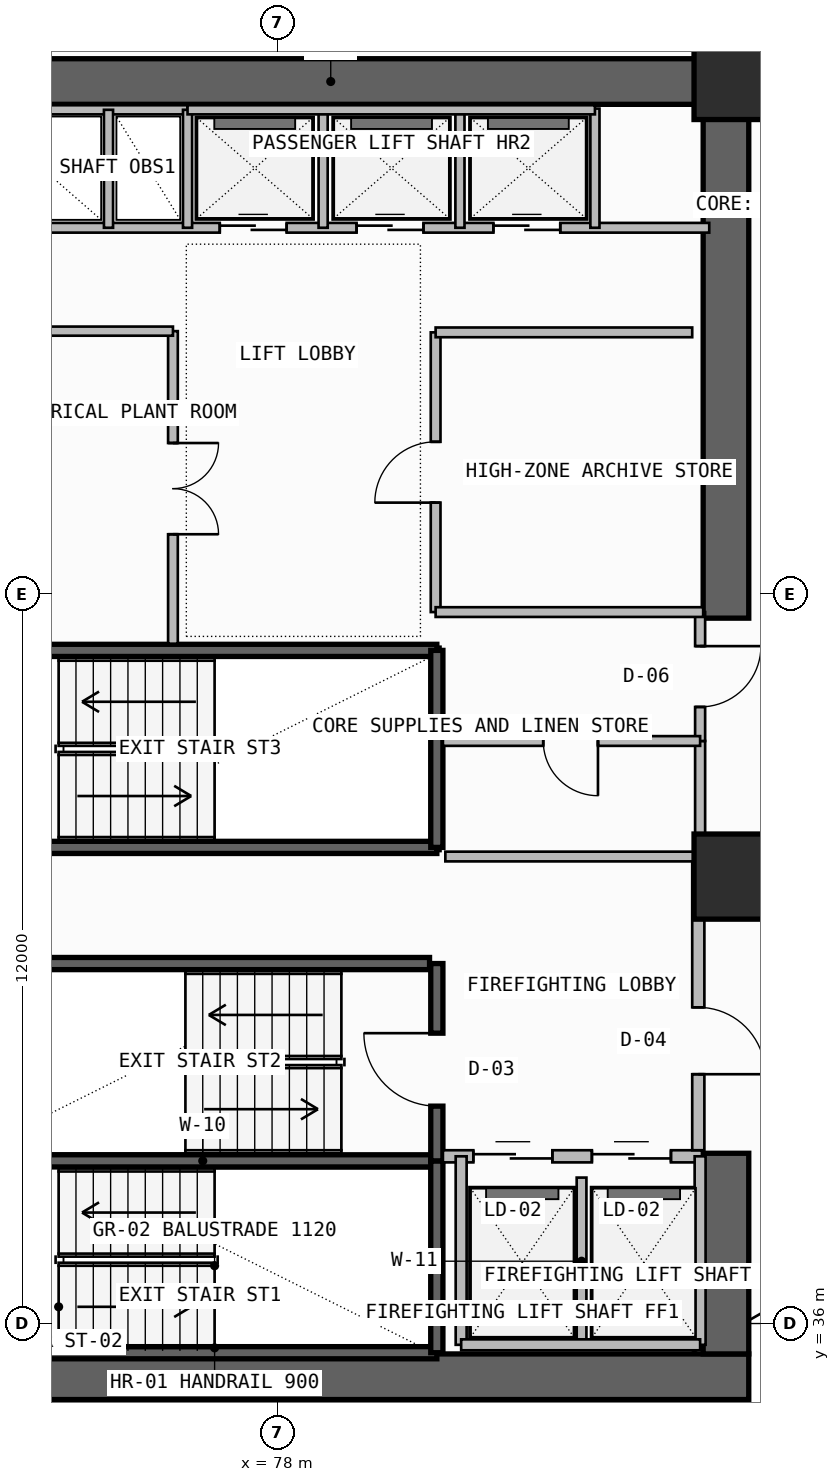
"""IFC4 building model, lengths in metres.
Left out: names, types, materials, properties, quantities, classifications, styles, units other than length and angle.
Written with IfcOpenShell. Run it as: python <this file> out.ifc"""

import sys

from ifc_helpers import new_model, si_unit, direction, frame, frame_2d, origin, origin_2d, place, context, subcontext, project, spatial, rectangle, extrude, element, fill, save


model = new_model("IFC4")
c1 = context("Model", 3, precision=1e-05, world=origin(), true_north=direction((0.0, 1.0)))
c2 = subcontext(c1, "Body", "Model", "MODEL_VIEW")
j1 = project(units=[si_unit("LENGTHUNIT", "METRE"), si_unit("PLANEANGLEUNIT", "RADIAN")], contexts=[c1])
p1 = place(None, origin())
s1 = spatial("IfcSite", under=j1, at=p1, CompositionType="ELEMENT")
p2 = place(p1, origin())
s2 = spatial("IfcBuilding", under=s1, at=p2, CompositionType="ELEMENT")
p3 = place(p2, frame((0.0, 0.0, 200.9)))
s3 = spatial("IfcBuildingStorey", under=s2, at=p3, CompositionType="ELEMENT", Elevation=200.9)
p4 = place(p3, frame((72.15, 35.125, -0.4), z_axis=(0.0, 0.0, 1.0), x_axis=(1.0, 0.0, 0.0)))
e1 = element("IfcWall", 1, at=p4, inside=s3, PredefinedType="SHEAR", context=c2, shape_type="SweptSolid", body=[
    extrude(rectangle(XDim=13.6, YDim=0.75, at=frame_2d((6.8, 0.0))), origin(), (0.0, 0.0, 1.0), 3.66),
])
p5 = place(p3, frame((85.375, 35.5, -0.4), z_axis=(0.0, 0.0, 1.0), x_axis=(0.0, 1.0, 0.0)))
e2 = element("IfcWall", 2, at=p5, inside=s3, PredefinedType="SHEAR", context=c2, shape_type="SweptSolid", body=[
    extrude(rectangle(XDim=3.3, YDim=0.75, at=frame_2d((1.65, 0.0))), origin(), (0.0, 0.0, 1.0), 3.66),
])
p6 = place(p3, frame((72.0, 56.425, -0.4), z_axis=(0.0, 0.0, 1.0), x_axis=(1.0, 0.0, 0.0)))
e3 = element("IfcWall", 3, at=p6, inside=s3, PredefinedType="SHEAR", context=c2, shape_type="SweptSolid", body=[
    extrude(rectangle(XDim=13.75, YDim=0.75, at=frame_2d((6.875, 0.0))), origin(), (0.0, 0.0, 1.0), 3.66),
])
p7 = place(p3, frame((85.375, 47.6, -0.4), z_axis=(0.0, 0.0, 1.0), x_axis=(0.0, 1.0, 0.0)))
e4 = element("IfcWall", 4, at=p7, inside=s3, PredefinedType="SHEAR", context=c2, shape_type="SweptSolid", body=[
    extrude(rectangle(XDim=8.45, YDim=0.75, at=frame_2d((4.225, 0.0))), origin(), (0.0, 0.0, 1.0), 3.66),
])
for number, where, z_axis, x_axis in (
    (5, (85.55, 43.35, 0.0), (0.0, 0.0, 1.0), (1.0, 0.0, 0.0)),
    (6, (85.55, 56.5, 0.0), (0.0, 0.0, 1.0), (1.0, 0.0, 0.0)),
):
    element("IfcColumn", number, at=place(p3, frame(where, z_axis=z_axis, x_axis=x_axis)), inside=s3, PredefinedType="COLUMN", context=c2, shape_type="SweptSolid", body=[
        extrude(rectangle(XDim=1.4, YDim=1.4, at=origin_2d()), origin(), (0.0, 0.0, 1.0), 3.52),
    ])
p8 = place(p3, frame((116.396, 56.722, 0.0), z_axis=(0.0, 0.0, 1.0), x_axis=(-0.977936620644, 0.208901809478, 0.0)))
e7 = element("IfcWall", 7, at=p8, inside=s3, PredefinedType="PARAPET", context=c2, shape_type="SweptSolid", body=[
    extrude(rectangle(XDim=31.685, YDim=0.2, at=frame_2d((15.843, 0.0))), origin(), (0.0, 0.0, 1.0), 1.15),
])
for number, where, z_axis, x_axis in (
    (8, (72.92, 35.52, -0.4), (0.0, 0.0, 1.0), (1.0, 0.0, 0.0)),
    (9, (72.92, 38.675, -0.4), (0.0, 0.0, 1.0), (1.0, 0.0, 0.0)),
):
    element("IfcWall", number, at=place(p3, frame(where, z_axis=z_axis, x_axis=x_axis)), inside=s3, PredefinedType="SOLIDWALL", context=c2, shape_type="SweptSolid", body=[
        extrude(rectangle(XDim=7.7, YDim=0.2, at=frame_2d((3.85, 0.0))), origin(), (0.0, 0.0, 1.0), 3.66),
    ])
p9 = place(p3, frame((80.62, 35.52, -0.4), z_axis=(0.0, 0.0, 1.0), x_axis=(0.0, 1.0, 0.0)))
e10 = element("IfcWall", 10, at=p9, inside=s3, PredefinedType="SOLIDWALL", context=c2, shape_type="SweptSolid", body=[
    extrude(rectangle(XDim=3.155, YDim=0.2, at=frame_2d((1.578, 0.0))), origin(), (0.0, 0.0, 1.0), 3.66),
])
p10 = place(p3, frame((80.62, 38.675, -0.4), z_axis=(0.0, 0.0, 1.0), x_axis=(0.0, 1.0, 0.0)))
e11 = element("IfcWall", 11, at=p10, inside=s3, PredefinedType="SOLIDWALL", context=c2, shape_type="SweptSolid", body=[
    extrude(rectangle(XDim=3.245, YDim=0.2, at=frame_2d((1.623, 0.0))), origin(), (0.0, 0.0, 1.0), 3.66),
])
p11 = place(p10, frame((0.9, 0.0, 0.4)))
e12 = element("IfcOpeningElement", 12, at=p11, cuts=e11, PredefinedType="OPENING", context=c2, shape_type="SweptSolid", body=[
    extrude(rectangle(XDim=1.2, YDim=2.2, at=frame_2d((0.6, 1.1))), frame((0.0, 0.11, 0.0), z_axis=(0.0, -1.0, 0.0), x_axis=(1.0, 0.0, 0.0)), (0.0, 0.0, 1.0), 0.22),
])
p12 = place(p3, frame((80.72, 38.75, 0.0), z_axis=(0.0, 0.0, 1.0), x_axis=(1.0, 0.0, 0.0)))
e13 = element("IfcWall", 13, at=p12, inside=s3, PredefinedType="SOLIDWALL", context=c2, shape_type="SweptSolid", body=[
    extrude(rectangle(XDim=4.26, YDim=0.2, at=frame_2d((2.13, 0.0))), origin(), (0.0, 0.0, 1.0), 3.26),
])
p13 = place(p12, frame((0.5, 0.0, 0.0)))
e14 = element("IfcOpeningElement", 14, at=p13, cuts=e13, PredefinedType="OPENING", context=c2, shape_type="SweptSolid", body=[
    extrude(rectangle(XDim=1.3, YDim=2.3, at=frame_2d((0.65, 1.15))), frame((0.0, 0.11, 0.0), z_axis=(0.0, -1.0, 0.0), x_axis=(1.0, 0.0, 0.0)), (0.0, 0.0, 1.0), 0.22),
])
p14 = place(p12, frame((2.45, 0.0, 0.0)))
e15 = element("IfcOpeningElement", 15, at=p14, cuts=e13, PredefinedType="OPENING", context=c2, shape_type="SweptSolid", body=[
    extrude(rectangle(XDim=1.3, YDim=2.3, at=frame_2d((0.65, 1.15))), frame((0.0, 0.11, 0.0), z_axis=(0.0, -1.0, 0.0), x_axis=(1.0, 0.0, 0.0)), (0.0, 0.0, 1.0), 0.22),
])
p15 = place(p3, frame((83.0, 35.65, 0.0), z_axis=(0.0, 0.0, 1.0), x_axis=(0.0, 1.0, 0.0)))
e16 = element("IfcWall", 16, at=p15, inside=s3, PredefinedType="PLUMBINGWALL", context=c2, shape_type="SweptSolid", body=[
    extrude(rectangle(XDim=2.75, YDim=0.16, at=frame_2d((1.375, 0.0))), origin(), (0.0, 0.0, 1.0), 3.26),
])
for number, where, z_axis, x_axis in (
    (17, (84.95, 35.65, 0.0), (0.0, 0.0, 1.0), (0.0, 1.0, 0.0)),
    (18, (81.02, 35.65, 0.0), (0.0, 0.0, 1.0), (0.0, 1.0, 0.0)),
):
    element("IfcWall", number, at=place(p3, frame(where, z_axis=z_axis, x_axis=x_axis)), inside=s3, PredefinedType="SOLIDWALL", context=c2, shape_type="SweptSolid", body=[
        extrude(rectangle(XDim=3.1, YDim=0.18, at=frame_2d((1.55, 0.0))), origin(), (0.0, 0.0, 1.0), 3.26),
    ])
p16 = place(p3, frame((81.02, 35.65, 0.0), z_axis=(0.0, 0.0, 1.0), x_axis=(1.0, 0.0, 0.0)))
e19 = element("IfcWall", 19, at=p16, inside=s3, PredefinedType="SOLIDWALL", context=c2, shape_type="SweptSolid", body=[
    extrude(rectangle(XDim=3.93, YDim=0.18, at=frame_2d((1.965, 0.0))), origin(), (0.0, 0.0, 1.0), 3.26),
])
p17 = place(p3, frame((84.92, 38.85, 0.0), z_axis=(0.0, 0.0, 1.0), x_axis=(0.0, 1.0, 0.0)))
e20 = element("IfcWall", 20, at=p17, inside=s3, PredefinedType="SOLIDWALL", context=c2, shape_type="SweptSolid", body=[
    extrude(rectangle(XDim=4.83, YDim=0.2, at=frame_2d((2.415, 0.0))), origin(), (0.0, 0.0, 1.0), 3.26),
])
p18 = place(p17, frame((1.25, 0.0, 0.0)))
e21 = element("IfcOpeningElement", 21, at=p18, cuts=e20, PredefinedType="OPENING", context=c2, shape_type="SweptSolid", body=[
    extrude(rectangle(XDim=1.1, YDim=2.2, at=frame_2d((0.55, 1.1))), frame((0.0, 0.11, 0.0), z_axis=(0.0, -1.0, 0.0), x_axis=(1.0, 0.0, 0.0)), (0.0, 0.0, 1.0), 0.22),
])
p19 = place(p3, frame((72.92, 41.92, -0.4), z_axis=(0.0, 0.0, 1.0), x_axis=(1.0, 0.0, 0.0)))
e22 = element("IfcWall", 22, at=p19, inside=s3, PredefinedType="SOLIDWALL", context=c2, shape_type="SweptSolid", body=[
    extrude(rectangle(XDim=7.58, YDim=0.2, at=frame_2d((3.79, 0.0))), origin(), (0.0, 0.0, 1.0), 3.66),
])
for number, where, z_axis, x_axis in (
    (23, (72.92, 43.83, -0.4), (0.0, 0.0, 1.0), (1.0, 0.0, 0.0)),
    (24, (72.92, 47.07, -0.4), (0.0, 0.0, 1.0), (1.0, 0.0, 0.0)),
):
    element("IfcWall", number, at=place(p3, frame(where, z_axis=z_axis, x_axis=x_axis)), inside=s3, PredefinedType="SOLIDWALL", context=c2, shape_type="SweptSolid", body=[
        extrude(rectangle(XDim=7.7, YDim=0.2, at=frame_2d((3.85, 0.0))), origin(), (0.0, 0.0, 1.0), 3.66),
    ])
p20 = place(p3, frame((80.62, 43.83, -0.4), z_axis=(0.0, 0.0, 1.0), x_axis=(0.0, 1.0, 0.0)))
e25 = element("IfcWall", 25, at=p20, inside=s3, PredefinedType="SOLIDWALL", context=c2, shape_type="SweptSolid", body=[
    extrude(rectangle(XDim=3.24, YDim=0.2, at=frame_2d((1.62, 0.0))), origin(), (0.0, 0.0, 1.0), 3.66),
])
p21 = place(p3, frame((84.95, 43.68, 0.0), z_axis=(0.0, 0.0, 1.0), x_axis=(0.0, 1.0, 0.0)))
e26 = element("IfcWall", 26, at=p21, inside=s3, PredefinedType="PLUMBINGWALL", context=c2, shape_type="SweptSolid", body=[
    extrude(rectangle(XDim=1.9, YDim=0.165, at=frame_2d((0.95, 0.0))), origin(), (0.0, 0.0, 1.0), 3.26),
])
p22 = place(p3, frame((84.95, 45.58, 0.0), z_axis=(0.0, 0.0, 1.0), x_axis=(0.0, 1.0, 0.0)))
e27 = element("IfcWall", 27, at=p22, inside=s3, PredefinedType="PARTITIONING", context=c2, shape_type="SweptSolid", body=[
    extrude(rectangle(XDim=2.12, YDim=0.165, at=frame_2d((1.06, 0.0))), origin(), (0.0, 0.0, 1.0), 3.26),
])
p23 = place(p22, frame((0.56, 0.0, 0.0)))
e28 = element("IfcOpeningElement", 28, at=p23, cuts=e27, PredefinedType="OPENING", context=c2, shape_type="SweptSolid", body=[
    extrude(rectangle(XDim=1.0, YDim=2.2, at=frame_2d((0.5, 1.1))), frame((0.0, 0.093, 0.0), z_axis=(0.0, -1.0, 0.0), x_axis=(1.0, 0.0, 0.0)), (0.0, 0.0, 1.0), 0.185),
])
p24 = place(p3, frame((80.72, 45.58, 0.0), z_axis=(0.0, 0.0, 1.0), x_axis=(1.0, 0.0, 0.0)))
e29 = element("IfcWall", 29, at=p24, inside=s3, PredefinedType="PLUMBINGWALL", context=c2, shape_type="SweptSolid", body=[
    extrude(rectangle(XDim=4.23, YDim=0.16, at=frame_2d((2.115, 0.0))), origin(), (0.0, 0.0, 1.0), 3.26),
])
p25 = place(p24, frame((1.65, 0.0, 0.0)))
e30 = element("IfcOpeningElement", 30, at=p25, cuts=e29, PredefinedType="OPENING", context=c2, shape_type="SweptSolid", body=[
    extrude(rectangle(XDim=0.9, YDim=2.1, at=frame_2d((0.45, 1.05))), frame((0.0, 0.09, 0.0), z_axis=(0.0, -1.0, 0.0), x_axis=(1.0, 0.0, 0.0)), (0.0, 0.0, 1.0), 0.18),
])
p26 = place(p3, frame((80.76, 43.68, 0.0), z_axis=(0.0, 0.0, 1.0), x_axis=(1.0, 0.0, 0.0)))
e31 = element("IfcWall", 31, at=p26, inside=s3, PredefinedType="PLUMBINGWALL", context=c2, shape_type="SweptSolid", body=[
    extrude(rectangle(XDim=4.19, YDim=0.16, at=frame_2d((2.095, 0.0))), origin(), (0.0, 0.0, 1.0), 3.26),
])
p27 = place(p3, frame((76.28, 47.18, 0.0), z_axis=(0.0, 0.0, 1.0), x_axis=(0.0, 1.0, 0.0)))
e32 = element("IfcWall", 32, at=p27, inside=s3, PredefinedType="SOLIDWALL", context=c2, shape_type="SweptSolid", body=[
    extrude(rectangle(XDim=5.14, YDim=0.16, at=frame_2d((2.57, 0.0))), origin(), (0.0, 0.0, 1.0), 3.26),
])
p28 = place(p27, frame((1.8, 0.0, 0.0)))
e33 = element("IfcOpeningElement", 33, at=p28, cuts=e32, PredefinedType="OPENING", context=c2, shape_type="SweptSolid", body=[
    extrude(rectangle(XDim=1.5, YDim=2.25, at=frame_2d((0.75, 1.125))), frame((0.0, 0.09, 0.0), z_axis=(0.0, -1.0, 0.0), x_axis=(1.0, 0.0, 0.0)), (0.0, 0.0, 1.0), 0.18),
])
p29 = place(p3, frame((72.95, 52.32, 0.0), z_axis=(0.0, 0.0, 1.0), x_axis=(1.0, 0.0, 0.0)))
e34 = element("IfcWall", 34, at=p29, inside=s3, PredefinedType="SOLIDWALL", context=c2, shape_type="SweptSolid", body=[
    extrude(rectangle(XDim=3.33, YDim=0.15, at=frame_2d((1.665, 0.0))), origin(), (0.0, 0.0, 1.0), 3.26),
])
p30 = place(p3, frame((80.6, 47.7, 0.0), z_axis=(0.0, 0.0, 1.0), x_axis=(0.0, 1.0, 0.0)))
e35 = element("IfcWall", 35, at=p30, inside=s3, PredefinedType="SOLIDWALL", context=c2, shape_type="SweptSolid", body=[
    extrude(rectangle(XDim=4.6, YDim=0.16, at=frame_2d((2.3, 0.0))), origin(), (0.0, 0.0, 1.0), 3.26),
])
p31 = place(p30, frame((1.8, 0.0, 0.0)))
e36 = element("IfcOpeningElement", 36, at=p31, cuts=e35, PredefinedType="OPENING", context=c2, shape_type="SweptSolid", body=[
    extrude(rectangle(XDim=1.0, YDim=2.2, at=frame_2d((0.5, 1.1))), frame((0.0, 0.09, 0.0), z_axis=(0.0, -1.0, 0.0), x_axis=(1.0, 0.0, 0.0)), (0.0, 0.0, 1.0), 0.18),
])
p32 = place(p3, frame((80.6, 47.7, 0.0), z_axis=(0.0, 0.0, 1.0), x_axis=(1.0, 0.0, 0.0)))
e37 = element("IfcWall", 37, at=p32, inside=s3, PredefinedType="SOLIDWALL", context=c2, shape_type="SweptSolid", body=[
    extrude(rectangle(XDim=4.4, YDim=0.16, at=frame_2d((2.2, 0.0))), origin(), (0.0, 0.0, 1.0), 3.26),
])
p33 = place(p3, frame((80.6, 52.3, 0.0), z_axis=(0.0, 0.0, 1.0), x_axis=(1.0, 0.0, 0.0)))
e38 = element("IfcWall", 38, at=p33, inside=s3, PredefinedType="SOLIDWALL", context=c2, shape_type="SweptSolid", body=[
    extrude(rectangle(XDim=4.22, YDim=0.16, at=frame_2d((2.11, 0.0))), origin(), (0.0, 0.0, 1.0), 3.26),
])
p34 = place(p3, frame((73.02, 54.02, 0.0), z_axis=(0.0, 0.0, 1.0), x_axis=(1.0, 0.0, 0.0)))
e39 = element("IfcWall", 39, at=p34, inside=s3, PredefinedType="SOLIDWALL", context=c2, shape_type="SweptSolid", body=[
    extrude(rectangle(XDim=12.08, YDim=0.16, at=frame_2d((6.04, 0.0))), origin(), (0.0, 0.0, 1.0), 3.26),
])
p35 = place(p34, frame((4.03, 0.0, 0.0)))
e40 = element("IfcOpeningElement", 40, at=p35, cuts=e39, PredefinedType="OPENING", context=c2, shape_type="SweptSolid", body=[
    extrude(rectangle(XDim=1.1, YDim=2.25, at=frame_2d((0.55, 1.125))), frame((0.0, 0.09, 0.0), z_axis=(0.0, -1.0, 0.0), x_axis=(1.0, 0.0, 0.0)), (0.0, 0.0, 1.0), 0.18),
])
p36 = place(p34, frame((6.28, 0.0, 0.0)))
e41 = element("IfcOpeningElement", 41, at=p36, cuts=e39, PredefinedType="OPENING", context=c2, shape_type="SweptSolid", body=[
    extrude(rectangle(XDim=1.1, YDim=2.25, at=frame_2d((0.55, 1.125))), frame((0.0, 0.09, 0.0), z_axis=(0.0, -1.0, 0.0), x_axis=(1.0, 0.0, 0.0)), (0.0, 0.0, 1.0), 0.18),
])
p37 = place(p34, frame((8.53, 0.0, 0.0)))
e42 = element("IfcOpeningElement", 42, at=p37, cuts=e39, PredefinedType="OPENING", context=c2, shape_type="SweptSolid", body=[
    extrude(rectangle(XDim=1.1, YDim=2.25, at=frame_2d((0.55, 1.125))), frame((0.0, 0.09, 0.0), z_axis=(0.0, -1.0, 0.0), x_axis=(1.0, 0.0, 0.0)), (0.0, 0.0, 1.0), 0.18),
])
p38 = place(p3, frame((73.02, 55.96, 0.0), z_axis=(0.0, 0.0, 1.0), x_axis=(1.0, 0.0, 0.0)))
e43 = element("IfcWall", 43, at=p38, inside=s3, PredefinedType="SOLIDWALL", context=c2, shape_type="SweptSolid", body=[
    extrude(rectangle(XDim=3.5, YDim=0.15, at=frame_2d((1.75, 0.0))), origin(), (0.0, 0.0, 1.0), 3.26),
])
p39 = place(p3, frame((76.52, 54.02, 0.0), z_axis=(0.0, 0.0, 1.0), x_axis=(0.0, 1.0, 0.0)))
e44 = element("IfcWall", 44, at=p39, inside=s3, PredefinedType="SOLIDWALL", context=c2, shape_type="SweptSolid", body=[
    extrude(rectangle(XDim=1.94, YDim=0.15, at=frame_2d((0.97, 0.0))), origin(), (0.0, 0.0, 1.0), 3.26),
])
p40 = place(p3, frame((75.22, 54.02, 0.0), z_axis=(0.0, 0.0, 1.0), x_axis=(0.0, 1.0, 0.0)))
e45 = element("IfcWall", 45, at=p40, inside=s3, PredefinedType="PLUMBINGWALL", context=c2, shape_type="SweptSolid", body=[
    extrude(rectangle(XDim=1.94, YDim=0.15, at=frame_2d((0.97, 0.0))), origin(), (0.0, 0.0, 1.0), 3.26),
])
for number, where, z_axis, x_axis in (
    (46, (78.75, 54.02, 0.0), (0.0, 0.0, 1.0), (0.0, 1.0, 0.0)),
    (47, (81.0, 54.02, 0.0), (0.0, 0.0, 1.0), (0.0, 1.0, 0.0)),
):
    element("IfcWall", number, at=place(p3, frame(where, z_axis=z_axis, x_axis=x_axis)), inside=s3, PredefinedType="PLUMBINGWALL", context=c2, shape_type="SweptSolid", body=[
        extrude(rectangle(XDim=1.96, YDim=0.15, at=frame_2d((0.98, 0.0))), origin(), (0.0, 0.0, 1.0), 3.26),
    ])
p41 = place(p3, frame((83.22, 54.02, 0.0), z_axis=(0.0, 0.0, 1.0), x_axis=(0.0, 1.0, 0.0)))
e48 = element("IfcWall", 48, at=p41, inside=s3, PredefinedType="SOLIDWALL", context=c2, shape_type="SweptSolid", body=[
    extrude(rectangle(XDim=1.96, YDim=0.15, at=frame_2d((0.98, 0.0))), origin(), (0.0, 0.0, 1.0), 3.26),
])
p42 = place(p3, frame((76.52, 55.96, 0.0), z_axis=(0.0, 0.0, 1.0), x_axis=(1.0, 0.0, 0.0)))
e49 = element("IfcWall", 49, at=p42, inside=s3, PredefinedType="SOLIDWALL", context=c2, shape_type="SweptSolid", body=[
    extrude(rectangle(XDim=6.7, YDim=0.15, at=frame_2d((3.35, 0.0))), origin(), (0.0, 0.0, 1.0), 3.26),
])
p43 = place(p11, origin())
e50 = element("IfcDoor", 50, at=p43, inside=s3, OperationType="SINGLE_SWING_RIGHT", PredefinedType="USERDEFINED", context=c2, shape_type="SweptSolid", body=[
    extrude(rectangle(XDim=1.2, YDim=2.2, at=frame_2d((0.6, 1.1))), frame((0.0, 0.025, 0.0), z_axis=(0.0, -1.0, 0.0), x_axis=(1.0, 0.0, 0.0)), (0.0, 0.0, 1.0), 0.05),
])
fill(e12, e50)
p44 = place(p13, origin())
e51 = element("IfcDoor", 51, at=p44, inside=s3, OperationType="DOUBLE_DOOR_SLIDING", PredefinedType="DOOR", context=c2, shape_type="SweptSolid", body=[
    extrude(rectangle(XDim=1.3, YDim=2.3, at=frame_2d((0.65, 1.15))), frame((0.0, 0.025, 0.0), z_axis=(0.0, -1.0, 0.0), x_axis=(1.0, 0.0, 0.0)), (0.0, 0.0, 1.0), 0.05),
])
fill(e14, e51)
p45 = place(p14, origin())
e52 = element("IfcDoor", 52, at=p45, inside=s3, OperationType="DOUBLE_DOOR_SLIDING", PredefinedType="DOOR", context=c2, shape_type="SweptSolid", body=[
    extrude(rectangle(XDim=1.3, YDim=2.3, at=frame_2d((0.65, 1.15))), frame((0.0, 0.025, 0.0), z_axis=(0.0, -1.0, 0.0), x_axis=(1.0, 0.0, 0.0)), (0.0, 0.0, 1.0), 0.05),
])
fill(e15, e52)
p46 = place(p18, frame((1.1, 0.0, 0.0), z_axis=(0.0, 0.0, 1.0), x_axis=(-1.0, 0.0, 0.0)))
e53 = element("IfcDoor", 53, at=p46, inside=s3, OperationType="SINGLE_SWING_RIGHT", PredefinedType="DOOR", context=c2, shape_type="SweptSolid", body=[
    extrude(rectangle(XDim=1.1, YDim=2.2, at=frame_2d((0.55, 1.1))), frame((0.0, 0.025, 0.0), z_axis=(0.0, -1.0, 0.0), x_axis=(1.0, 0.0, 0.0)), (0.0, 0.0, 1.0), 0.05),
])
fill(e21, e53)
p47 = place(p23, frame((1.0, 0.0, 0.0), z_axis=(0.0, 0.0, 1.0), x_axis=(-1.0, 0.0, 0.0)))
e54 = element("IfcDoor", 54, at=p47, inside=s3, OperationType="SINGLE_SWING_LEFT", PredefinedType="DOOR", context=c2, shape_type="SweptSolid", body=[
    extrude(rectangle(XDim=1.0, YDim=2.2, at=frame_2d((0.5, 1.1))), frame((0.0, 0.025, 0.0), z_axis=(0.0, -1.0, 0.0), x_axis=(1.0, 0.0, 0.0)), (0.0, 0.0, 1.0), 0.05),
])
fill(e28, e54)
p48 = place(p25, frame((0.9, 0.0, 0.0), z_axis=(0.0, 0.0, 1.0), x_axis=(-1.0, 0.0, 0.0)))
e55 = element("IfcDoor", 55, at=p48, inside=s3, OperationType="SINGLE_SWING_LEFT", PredefinedType="DOOR", context=c2, shape_type="SweptSolid", body=[
    extrude(rectangle(XDim=0.9, YDim=2.1, at=frame_2d((0.45, 1.05))), frame((0.0, 0.025, 0.0), z_axis=(0.0, -1.0, 0.0), x_axis=(1.0, 0.0, 0.0)), (0.0, 0.0, 1.0), 0.05),
])
fill(e30, e55)
p49 = place(p28, frame((1.5, 0.0, 0.0), z_axis=(0.0, 0.0, 1.0), x_axis=(-1.0, 0.0, 0.0)))
e56 = element("IfcDoor", 56, at=p49, inside=s3, OperationType="DOUBLE_DOOR_SINGLE_SWING", PredefinedType="DOOR", context=c2, shape_type="SweptSolid", body=[
    extrude(rectangle(XDim=1.5, YDim=2.25, at=frame_2d((0.75, 1.125))), frame((0.0, 0.025, 0.0), z_axis=(0.0, -1.0, 0.0), x_axis=(1.0, 0.0, 0.0)), (0.0, 0.0, 1.0), 0.05),
])
fill(e33, e56)
p50 = place(p31, origin())
e57 = element("IfcDoor", 57, at=p50, inside=s3, OperationType="SINGLE_SWING_LEFT", PredefinedType="DOOR", context=c2, shape_type="SweptSolid", body=[
    extrude(rectangle(XDim=1.0, YDim=2.2, at=frame_2d((0.5, 1.1))), frame((0.0, 0.025, 0.0), z_axis=(0.0, -1.0, 0.0), x_axis=(1.0, 0.0, 0.0)), (0.0, 0.0, 1.0), 0.05),
])
fill(e36, e57)
p51 = place(p35, origin())
e58 = element("IfcDoor", 58, at=p51, inside=s3, OperationType="DOUBLE_DOOR_SLIDING", PredefinedType="DOOR", context=c2, shape_type="SweptSolid", body=[
    extrude(rectangle(XDim=1.1, YDim=2.25, at=frame_2d((0.55, 1.125))), frame((0.0, 0.025, 0.0), z_axis=(0.0, -1.0, 0.0), x_axis=(1.0, 0.0, 0.0)), (0.0, 0.0, 1.0), 0.05),
])
fill(e40, e58)
p52 = place(p36, origin())
e59 = element("IfcDoor", 59, at=p52, inside=s3, OperationType="DOUBLE_DOOR_SLIDING", PredefinedType="DOOR", context=c2, shape_type="SweptSolid", body=[
    extrude(rectangle(XDim=1.1, YDim=2.25, at=frame_2d((0.55, 1.125))), frame((0.0, 0.025, 0.0), z_axis=(0.0, -1.0, 0.0), x_axis=(1.0, 0.0, 0.0)), (0.0, 0.0, 1.0), 0.05),
])
fill(e41, e59)
p53 = place(p37, origin())
e60 = element("IfcDoor", 60, at=p53, inside=s3, OperationType="DOUBLE_DOOR_SLIDING", PredefinedType="DOOR", context=c2, shape_type="SweptSolid", body=[
    extrude(rectangle(XDim=1.1, YDim=2.25, at=frame_2d((0.55, 1.125))), frame((0.0, 0.025, 0.0), z_axis=(0.0, -1.0, 0.0), x_axis=(1.0, 0.0, 0.0)), (0.0, 0.0, 1.0), 0.05),
])
fill(e42, e60)
save(model, sys.argv[1])
